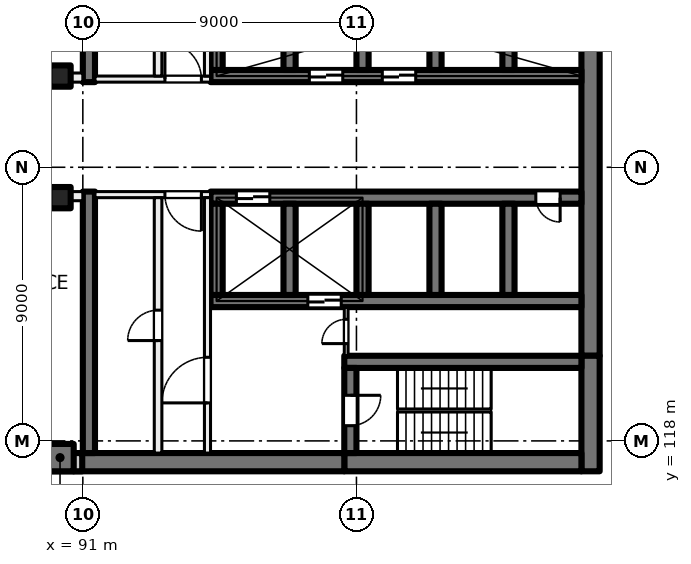
"""IFC4 building model, lengths in metres.
Left out: names, types, materials, properties, quantities, classifications, styles, units other than length and angle.
Written with IfcOpenShell. Run it as: python <this file> out.ifc"""

import sys

from ifc_helpers import new_model, si_unit, direction, frame, frame_2d, origin, origin_2d, place, context, subcontext, project, spatial, rectangle, extrude, element, fill, save


model = new_model("IFC4")
c1 = context("Model", 3, precision=1e-05, world=origin(), true_north=direction((0.0, 1.0)))
c2 = subcontext(c1, "Body", "Model", "MODEL_VIEW")
j1 = project(units=[si_unit("LENGTHUNIT", "METRE"), si_unit("PLANEANGLEUNIT", "RADIAN")], contexts=[c1])
p1 = place(None, origin())
s1 = spatial("IfcSite", under=j1, at=p1, CompositionType="ELEMENT")
p2 = place(p1, origin())
s2 = spatial("IfcBuilding", under=s1, at=p2, CompositionType="ELEMENT")
p3 = place(p2, frame((0.0, 0.0, 43.5)))
s3 = spatial("IfcBuildingStorey", under=s2, at=p3, CompositionType="ELEMENT", Elevation=43.5)
for number, where, z_axis, x_axis in (
    (1, (90.25, 130.0, 0.0), (0.0, 0.0, 1.0), (1.0, 0.0, 0.0)),
    (2, (90.25, 126.0, 0.0), (0.0, 0.0, 1.0), (1.0, 0.0, 0.0)),
):
    element("IfcColumn", number, at=place(p3, frame(where, z_axis=z_axis, x_axis=x_axis)), inside=s3, PredefinedType="COLUMN", context=c2, shape_type="SweptSolid", body=[
        extrude(rectangle(XDim=0.7, YDim=0.7, at=origin_2d()), origin(), (0.0, 0.0, 1.0), 4.0),
    ])
p4 = place(p3, frame((90.25, 117.45, 0.0), z_axis=(0.0, 0.0, 1.0), x_axis=(1.0, 0.0, 0.0)))
e3 = element("IfcColumn", 3, at=p4, inside=s3, PredefinedType="COLUMN", context=c2, shape_type="SweptSolid", body=[
    extrude(rectangle(XDim=0.9, YDim=0.9, at=origin_2d()), origin(), (0.0, 0.0, 1.0), 4.0),
])
p5 = place(p3, frame((107.7, 135.2, 0.0), z_axis=(0.0, 0.0, 1.0), x_axis=(0.0, -1.0, 0.0)))
e4 = element("IfcWall", 4, at=p5, inside=s3, PredefinedType="SHEAR", context=c2, shape_type="SweptSolid", body=[
    extrude(rectangle(XDim=14.4, YDim=0.6, at=frame_2d((7.2, 0.0))), origin(), (0.0, 0.0, 1.0), 4.0),
])
p6 = place(p3, frame((107.7, 120.8, 0.0), z_axis=(0.0, 0.0, 1.0), x_axis=(0.0, -1.0, 0.0)))
e5 = element("IfcWall", 5, at=p6, inside=s3, PredefinedType="SHEAR", context=c2, shape_type="SweptSolid", body=[
    extrude(rectangle(XDim=3.8, YDim=0.6, at=frame_2d((1.9, 0.0))), origin(), (0.0, 0.0, 1.0), 4.0),
])
p7 = place(p3, frame((107.4, 117.3, 0.0), z_axis=(0.0, 0.0, 1.0), x_axis=(-1.0, 0.0, 0.0)))
e6 = element("IfcWall", 6, at=p7, inside=s3, PredefinedType="SHEAR", context=c2, shape_type="SweptSolid", body=[
    extrude(rectangle(XDim=7.8, YDim=0.6, at=frame_2d((3.9, 0.0))), origin(), (0.0, 0.0, 1.0), 4.0),
])
p8 = place(p3, frame((99.6, 117.3, 0.0), z_axis=(0.0, 0.0, 1.0), x_axis=(-1.0, 0.0, 0.0)))
e7 = element("IfcWall", 7, at=p8, inside=s3, PredefinedType="SHEAR", context=c2, shape_type="SweptSolid", body=[
    extrude(rectangle(XDim=8.9, YDim=0.6, at=frame_2d((4.45, 0.0))), origin(), (0.0, 0.0, 1.0), 4.0),
])
p9 = place(p3, frame((107.4, 120.6, 0.0), z_axis=(0.0, 0.0, 1.0), x_axis=(-1.0, 0.0, 0.0)))
e8 = element("IfcWall", 8, at=p9, inside=s3, PredefinedType="SHEAR", context=c2, shape_type="SweptSolid", body=[
    extrude(rectangle(XDim=7.8, YDim=0.4, at=frame_2d((3.9, 0.0))), origin(), (0.0, 0.0, 1.0), 4.0),
])
p10 = place(p3, frame((99.8, 120.4, 0.0), z_axis=(0.0, 0.0, 1.0), x_axis=(0.0, -1.0, 0.0)))
e9 = element("IfcWall", 9, at=p10, inside=s3, PredefinedType="SHEAR", context=c2, shape_type="SweptSolid", body=[
    extrude(rectangle(XDim=2.8, YDim=0.4, at=frame_2d((1.4, 0.0))), origin(), (0.0, 0.0, 1.0), 4.0),
])
p11 = place(p10, frame((0.9, 0.0, 0.0)))
e10 = element("IfcOpeningElement", 10, at=p11, cuts=e9, PredefinedType="OPENING", context=c2, shape_type="SweptSolid", body=[
    extrude(rectangle(XDim=1.0, YDim=2.1, at=frame_2d((0.5, 1.05))), frame((0.0, 0.21, 0.0), z_axis=(0.0, -1.0, 0.0), x_axis=(1.0, 0.0, 0.0)), (0.0, 0.0, 1.0), 0.42),
])
p12 = place(p3, frame((107.4, 130.0, 0.0), z_axis=(0.0, 0.0, 1.0), x_axis=(-1.0, 0.0, 0.0)))
e11 = element("IfcWall", 11, at=p12, inside=s3, PredefinedType="SHEAR", context=c2, shape_type="SweptSolid", body=[
    extrude(rectangle(XDim=12.2, YDim=0.4, at=frame_2d((6.1, 0.0))), origin(), (0.0, 0.0, 1.0), 4.0),
])
p13 = place(p12, frame((5.45, 0.0, 0.0)))
e12 = element("IfcOpeningElement", 12, at=p13, cuts=e11, PredefinedType="OPENING", context=c2, shape_type="SweptSolid", body=[
    extrude(rectangle(XDim=1.1, YDim=2.1, at=frame_2d((0.55, 1.05))), frame((0.0, 0.21, 0.0), z_axis=(0.0, -1.0, 0.0), x_axis=(1.0, 0.0, 0.0)), (0.0, 0.0, 1.0), 0.42),
])
p14 = place(p12, frame((7.85, 0.0, 0.0)))
e13 = element("IfcOpeningElement", 13, at=p14, cuts=e11, PredefinedType="OPENING", context=c2, shape_type="SweptSolid", body=[
    extrude(rectangle(XDim=1.1, YDim=2.1, at=frame_2d((0.55, 1.05))), frame((0.0, 0.21, 0.0), z_axis=(0.0, -1.0, 0.0), x_axis=(1.0, 0.0, 0.0)), (0.0, 0.0, 1.0), 0.42),
])
for number, where, z_axis, x_axis in (
    (14, (105.0, 133.2, 0.0), (0.0, 0.0, 1.0), (0.0, -1.0, 0.0)),
    (15, (102.6, 133.2, 0.0), (0.0, 0.0, 1.0), (0.0, -1.0, 0.0)),
    (16, (100.2, 133.2, 0.0), (0.0, 0.0, 1.0), (0.0, -1.0, 0.0)),
    (17, (97.8, 133.2, 0.0), (0.0, 0.0, 1.0), (0.0, -1.0, 0.0)),
    (18, (95.4, 133.2, 0.0), (0.0, 0.0, 1.0), (0.0, -1.0, 0.0)),
):
    element("IfcWall", number, at=place(p3, frame(where, z_axis=z_axis, x_axis=x_axis)), inside=s3, PredefinedType="SHEAR", context=c2, shape_type="SweptSolid", body=[
        extrude(rectangle(XDim=3.0, YDim=0.4, at=frame_2d((1.5, 0.0))), origin(), (0.0, 0.0, 1.0), 4.0),
    ])
p15 = place(p3, frame((107.4, 126.0, 0.0), z_axis=(0.0, 0.0, 1.0), x_axis=(-1.0, 0.0, 0.0)))
e19 = element("IfcWall", 19, at=p15, inside=s3, PredefinedType="SHEAR", context=c2, shape_type="SweptSolid", body=[
    extrude(rectangle(XDim=12.2, YDim=0.4, at=frame_2d((6.1, 0.0))), origin(), (0.0, 0.0, 1.0), 4.0),
])
p16 = place(p15, frame((10.25, 0.0, 0.0)))
e20 = element("IfcOpeningElement", 20, at=p16, cuts=e19, PredefinedType="OPENING", context=c2, shape_type="SweptSolid", body=[
    extrude(rectangle(XDim=1.1, YDim=2.1, at=frame_2d((0.55, 1.05))), frame((0.0, 0.21, 0.0), z_axis=(0.0, -1.0, 0.0), x_axis=(1.0, 0.0, 0.0)), (0.0, 0.0, 1.0), 0.42),
])
p17 = place(p15, frame((0.7, 0.0, 0.0)))
e21 = element("IfcOpeningElement", 21, at=p17, cuts=e19, PredefinedType="OPENING", context=c2, shape_type="SweptSolid", body=[
    extrude(rectangle(XDim=0.8, YDim=2.1, at=frame_2d((0.4, 1.05))), frame((0.0, 0.21, 0.0), z_axis=(0.0, -1.0, 0.0), x_axis=(1.0, 0.0, 0.0)), (0.0, 0.0, 1.0), 0.42),
])
p18 = place(p3, frame((107.4, 122.6, 0.0), z_axis=(0.0, 0.0, 1.0), x_axis=(-1.0, 0.0, 0.0)))
e22 = element("IfcWall", 22, at=p18, inside=s3, PredefinedType="SHEAR", context=c2, shape_type="SweptSolid", body=[
    extrude(rectangle(XDim=12.2, YDim=0.4, at=frame_2d((6.1, 0.0))), origin(), (0.0, 0.0, 1.0), 4.0),
])
p19 = place(p18, frame((7.9, 0.0, 0.0)))
e23 = element("IfcOpeningElement", 23, at=p19, cuts=e22, PredefinedType="OPENING", context=c2, shape_type="SweptSolid", body=[
    extrude(rectangle(XDim=1.1, YDim=2.1, at=frame_2d((0.55, 1.05))), frame((0.0, 0.21, 0.0), z_axis=(0.0, -1.0, 0.0), x_axis=(1.0, 0.0, 0.0)), (0.0, 0.0, 1.0), 0.42),
])
for number, where, z_axis, x_axis in (
    (24, (105.0, 125.8, 0.0), (0.0, 0.0, 1.0), (0.0, -1.0, 0.0)),
    (25, (102.6, 125.8, 0.0), (0.0, 0.0, 1.0), (0.0, -1.0, 0.0)),
    (26, (100.2, 125.8, 0.0), (0.0, 0.0, 1.0), (0.0, -1.0, 0.0)),
    (27, (97.8, 125.8, 0.0), (0.0, 0.0, 1.0), (0.0, -1.0, 0.0)),
    (28, (95.4, 125.8, 0.0), (0.0, 0.0, 1.0), (0.0, -1.0, 0.0)),
):
    element("IfcWall", number, at=place(p3, frame(where, z_axis=z_axis, x_axis=x_axis)), inside=s3, PredefinedType="SHEAR", context=c2, shape_type="SweptSolid", body=[
        extrude(rectangle(XDim=3.0, YDim=0.4, at=frame_2d((1.5, 0.0))), origin(), (0.0, 0.0, 1.0), 4.0),
    ])
for number, where, z_axis, x_axis in (
    (29, (91.2, 138.4, 0.0), (0.0, 0.0, 1.0), (0.0, -1.0, 0.0)),
    (30, (91.2, 126.2, 0.0), (0.0, 0.0, 1.0), (0.0, -1.0, 0.0)),
):
    element("IfcWall", number, at=place(p3, frame(where, z_axis=z_axis, x_axis=x_axis)), inside=s3, PredefinedType="SHEAR", context=c2, shape_type="SweptSolid", body=[
        extrude(rectangle(XDim=8.6, YDim=0.4, at=frame_2d((4.3, 0.0))), origin(), (0.0, 0.0, 1.0), 4.0),
    ])
p20 = place(p3, frame((90.98, 117.3, 0.0), z_axis=(0.0, 0.0, 1.0), x_axis=(-1.0, 0.0, 0.0)))
e31 = element("IfcWall", 31, at=p20, inside=s3, PredefinedType="SOLIDWALL", context=c2, shape_type="SweptSolid", body=[
    extrude(rectangle(XDim=33.745, YDim=0.6, at=frame_2d((16.873, 0.0))), origin(), (0.0, 0.0, 1.0), 3.625),
])
p21 = place(p20, frame((1.48, 0.0, 0.9)))
e32 = element("IfcOpeningElement", 32, at=p21, cuts=e31, PredefinedType="OPENING", context=c2, shape_type="SweptSolid", body=[
    extrude(rectangle(XDim=3.0, YDim=2.4, at=frame_2d((1.5, 1.2))), frame((0.0, 0.31, 0.0), z_axis=(0.0, -1.0, 0.0), x_axis=(1.0, 0.0, 0.0)), (0.0, 0.0, 1.0), 0.62),
])
p22 = place(p20, frame((5.98, 0.0, 0.9)))
e33 = element("IfcOpeningElement", 33, at=p22, cuts=e31, PredefinedType="OPENING", context=c2, shape_type="SweptSolid", body=[
    extrude(rectangle(XDim=3.0, YDim=2.4, at=frame_2d((1.5, 1.2))), frame((0.0, 0.31, 0.0), z_axis=(0.0, -1.0, 0.0), x_axis=(1.0, 0.0, 0.0)), (0.0, 0.0, 1.0), 0.62),
])
p23 = place(p20, frame((10.48, 0.0, 0.9)))
e34 = element("IfcOpeningElement", 34, at=p23, cuts=e31, PredefinedType="OPENING", context=c2, shape_type="SweptSolid", body=[
    extrude(rectangle(XDim=3.0, YDim=2.4, at=frame_2d((1.5, 1.2))), frame((0.0, 0.31, 0.0), z_axis=(0.0, -1.0, 0.0), x_axis=(1.0, 0.0, 0.0)), (0.0, 0.0, 1.0), 0.62),
])
p24 = place(p20, frame((14.98, 0.0, 0.9)))
e35 = element("IfcOpeningElement", 35, at=p24, cuts=e31, PredefinedType="OPENING", context=c2, shape_type="SweptSolid", body=[
    extrude(rectangle(XDim=3.0, YDim=2.4, at=frame_2d((1.5, 1.2))), frame((0.0, 0.31, 0.0), z_axis=(0.0, -1.0, 0.0), x_axis=(1.0, 0.0, 0.0)), (0.0, 0.0, 1.0), 0.62),
])
p25 = place(p20, frame((19.48, 0.0, 0.9)))
e36 = element("IfcOpeningElement", 36, at=p25, cuts=e31, PredefinedType="OPENING", context=c2, shape_type="SweptSolid", body=[
    extrude(rectangle(XDim=3.0, YDim=2.4, at=frame_2d((1.5, 1.2))), frame((0.0, 0.31, 0.0), z_axis=(0.0, -1.0, 0.0), x_axis=(1.0, 0.0, 0.0)), (0.0, 0.0, 1.0), 0.62),
])
p26 = place(p20, frame((24.58, 0.0, 0.0)))
e37 = element("IfcOpeningElement", 37, at=p26, cuts=e31, PredefinedType="OPENING", context=c2, shape_type="SweptSolid", body=[
    extrude(rectangle(XDim=1.8, YDim=2.4, at=frame_2d((0.9, 1.2))), frame((0.0, 0.31, 0.0), z_axis=(0.0, -1.0, 0.0), x_axis=(1.0, 0.0, 0.0)), (0.0, 0.0, 1.0), 0.62),
])
p27 = place(p20, frame((28.48, 0.0, 0.9)))
e38 = element("IfcOpeningElement", 38, at=p27, cuts=e31, PredefinedType="OPENING", context=c2, shape_type="SweptSolid", body=[
    extrude(rectangle(XDim=3.0, YDim=2.4, at=frame_2d((1.5, 1.2))), frame((0.0, 0.31, 0.0), z_axis=(0.0, -1.0, 0.0), x_axis=(1.0, 0.0, 0.0)), (0.0, 0.0, 1.0), 0.62),
])
p28 = place(p3, frame((95.2, 126.1, 0.0), z_axis=(0.0, 0.0, 1.0), x_axis=(-1.0, 0.0, 0.0)))
e39 = element("IfcWall", 39, at=p28, inside=s3, PredefinedType="PARTITIONING", context=c2, shape_type="SweptSolid", body=[
    extrude(rectangle(XDim=3.8, YDim=0.2, at=frame_2d((1.9, 0.0))), origin(), (0.0, 0.0, 1.0), 3.625),
])
p29 = place(p28, frame((0.3, 0.0, 0.0)))
e40 = element("IfcOpeningElement", 40, at=p29, cuts=e39, PredefinedType="OPENING", context=c2, shape_type="SweptSolid", body=[
    extrude(rectangle(XDim=1.2, YDim=2.1, at=frame_2d((0.6, 1.05))), frame((0.0, 0.11, 0.0), z_axis=(0.0, -1.0, 0.0), x_axis=(1.0, 0.0, 0.0)), (0.0, 0.0, 1.0), 0.22),
])
p30 = place(p3, frame((95.1, 117.6, 0.0), z_axis=(0.0, 0.0, 1.0), x_axis=(0.0, 1.0, 0.0)))
e41 = element("IfcWall", 41, at=p30, inside=s3, PredefinedType="PARTITIONING", context=c2, shape_type="SweptSolid", body=[
    extrude(rectangle(XDim=8.4, YDim=0.2, at=frame_2d((4.2, 0.0))), origin(), (0.0, 0.0, 1.0), 3.625),
])
p31 = place(p30, frame((1.65, 0.0, 0.0)))
e42 = element("IfcOpeningElement", 42, at=p31, cuts=e41, PredefinedType="OPENING", context=c2, shape_type="SweptSolid", body=[
    extrude(rectangle(XDim=1.5, YDim=2.1, at=frame_2d((0.75, 1.05))), frame((0.0, 0.11, 0.0), z_axis=(0.0, -1.0, 0.0), x_axis=(1.0, 0.0, 0.0)), (0.0, 0.0, 1.0), 0.22),
])
p32 = place(p3, frame((93.475, 117.6, 0.0), z_axis=(0.0, 0.0, 1.0), x_axis=(0.0, 1.0, 0.0)))
e43 = element("IfcWall", 43, at=p32, inside=s3, PredefinedType="PARTITIONING", context=c2, shape_type="SweptSolid", body=[
    extrude(rectangle(XDim=8.4, YDim=0.25, at=frame_2d((4.2, 0.0))), origin(), (0.0, 0.0, 1.0), 3.625),
])
p33 = place(p32, frame((3.7, 0.0, 0.0)))
e44 = element("IfcOpeningElement", 44, at=p33, cuts=e43, PredefinedType="OPENING", context=c2, shape_type="SweptSolid", body=[
    extrude(rectangle(XDim=1.0, YDim=2.1, at=frame_2d((0.5, 1.05))), frame((0.0, 0.135, 0.0), z_axis=(0.0, -1.0, 0.0), x_axis=(1.0, 0.0, 0.0)), (0.0, 0.0, 1.0), 0.27),
])
p34 = place(p3, frame((99.663, 120.8, 0.0), z_axis=(0.0, 0.0, 1.0), x_axis=(0.0, 1.0, 0.0)))
e45 = element("IfcWall", 45, at=p34, inside=s3, PredefinedType="PARTITIONING", context=c2, shape_type="SweptSolid", body=[
    extrude(rectangle(XDim=1.6, YDim=0.125, at=frame_2d((0.8, 0.0))), origin(), (0.0, 0.0, 1.0), 3.625),
])
p35 = place(p34, frame((0.4, 0.0, 0.0)))
e46 = element("IfcOpeningElement", 46, at=p35, cuts=e45, PredefinedType="OPENING", context=c2, shape_type="SweptSolid", body=[
    extrude(rectangle(XDim=0.8, YDim=2.1, at=frame_2d((0.4, 1.05))), frame((0.0, 0.073, 0.0), z_axis=(0.0, -1.0, 0.0), x_axis=(1.0, 0.0, 0.0)), (0.0, 0.0, 1.0), 0.145),
])
p36 = place(p3, frame((91.4, 129.9, 0.0), z_axis=(0.0, 0.0, 1.0), x_axis=(1.0, 0.0, 0.0)))
e47 = element("IfcWall", 47, at=p36, inside=s3, PredefinedType="PARTITIONING", context=c2, shape_type="SweptSolid", body=[
    extrude(rectangle(XDim=3.8, YDim=0.2, at=frame_2d((1.9, 0.0))), origin(), (0.0, 0.0, 1.0), 3.625),
])
p37 = place(p36, frame((2.3, 0.0, 0.0)))
e48 = element("IfcOpeningElement", 48, at=p37, cuts=e47, PredefinedType="OPENING", context=c2, shape_type="SweptSolid", body=[
    extrude(rectangle(XDim=1.2, YDim=2.1, at=frame_2d((0.6, 1.05))), frame((0.0, 0.11, 0.0), z_axis=(0.0, -1.0, 0.0), x_axis=(1.0, 0.0, 0.0)), (0.0, 0.0, 1.0), 0.22),
])
p38 = place(p3, frame((95.1, 130.0, 0.0), z_axis=(0.0, 0.0, 1.0), x_axis=(0.0, 1.0, 0.0)))
e49 = element("IfcWall", 49, at=p38, inside=s3, PredefinedType="PARTITIONING", context=c2, shape_type="SweptSolid", body=[
    extrude(rectangle(XDim=8.4, YDim=0.2, at=frame_2d((4.2, 0.0))), origin(), (0.0, 0.0, 1.0), 3.625),
])
p39 = place(p38, frame((5.25, 0.0, 0.0)))
e50 = element("IfcOpeningElement", 50, at=p39, cuts=e49, PredefinedType="OPENING", context=c2, shape_type="SweptSolid", body=[
    extrude(rectangle(XDim=1.5, YDim=2.1, at=frame_2d((0.75, 1.05))), frame((0.0, 0.11, 0.0), z_axis=(0.0, -1.0, 0.0), x_axis=(1.0, 0.0, 0.0)), (0.0, 0.0, 1.0), 0.22),
])
p40 = place(p3, frame((93.475, 130.0, 0.0), z_axis=(0.0, 0.0, 1.0), x_axis=(0.0, 1.0, 0.0)))
e51 = element("IfcWall", 51, at=p40, inside=s3, PredefinedType="PARTITIONING", context=c2, shape_type="SweptSolid", body=[
    extrude(rectangle(XDim=8.4, YDim=0.25, at=frame_2d((4.2, 0.0))), origin(), (0.0, 0.0, 1.0), 3.625),
])
p41 = place(p40, frame((2.375, 0.0, 0.0)))
e52 = element("IfcOpeningElement", 52, at=p41, cuts=e51, PredefinedType="OPENING", context=c2, shape_type="SweptSolid", body=[
    extrude(rectangle(XDim=0.8, YDim=2.1, at=frame_2d((0.4, 1.05))), frame((0.0, 0.135, 0.0), z_axis=(0.0, -1.0, 0.0), x_axis=(1.0, 0.0, 0.0)), (0.0, 0.0, 1.0), 0.27),
])
p42 = place(p40, frame((6.625, 0.0, 0.0)))
e53 = element("IfcOpeningElement", 53, at=p42, cuts=e51, PredefinedType="OPENING", context=c2, shape_type="SweptSolid", body=[
    extrude(rectangle(XDim=0.8, YDim=2.1, at=frame_2d((0.4, 1.05))), frame((0.0, 0.135, 0.0), z_axis=(0.0, -1.0, 0.0), x_axis=(1.0, 0.0, 0.0)), (0.0, 0.0, 1.0), 0.27),
])
p43 = place(p3, frame((72.5, 129.95, 0.0), z_axis=(0.0, 0.0, 1.0), x_axis=(1.0, 0.0, 0.0)))
e54 = element("IfcWall", 54, at=p43, inside=s3, PredefinedType="PARTITIONING", context=c2, shape_type="SweptSolid", body=[
    extrude(rectangle(XDim=18.5, YDim=0.3, at=frame_2d((9.25, 0.0))), origin(), (0.0, 0.0, 1.0), 3.625),
])
p44 = place(p43, frame((6.0, 0.0, 0.0)))
e55 = element("IfcOpeningElement", 55, at=p44, cuts=e54, PredefinedType="OPENING", context=c2, shape_type="SweptSolid", body=[
    extrude(rectangle(XDim=1.0, YDim=2.1, at=frame_2d((0.5, 1.05))), frame((0.0, 0.16, 0.0), z_axis=(0.0, -1.0, 0.0), x_axis=(1.0, 0.0, 0.0)), (0.0, 0.0, 1.0), 0.32),
])
p45 = place(p43, frame((1.225, 0.0, 0.0)))
e56 = element("IfcOpeningElement", 56, at=p45, cuts=e54, PredefinedType="OPENING", context=c2, shape_type="SweptSolid", body=[
    extrude(rectangle(XDim=1.8, YDim=2.1, at=frame_2d((0.9, 1.05))), frame((0.0, 0.16, 0.0), z_axis=(0.0, -1.0, 0.0), x_axis=(1.0, 0.0, 0.0)), (0.0, 0.0, 1.0), 0.32),
])
p46 = place(p3, frame((91.0, 126.05, 0.0), z_axis=(0.0, 0.0, 1.0), x_axis=(-1.0, 0.0, 0.0)))
e57 = element("IfcWall", 57, at=p46, inside=s3, PredefinedType="PARTITIONING", context=c2, shape_type="SweptSolid", body=[
    extrude(rectangle(XDim=43.785, YDim=0.3, at=frame_2d((21.893, 0.0))), origin(), (0.0, 0.0, 1.0), 3.625),
])
p47 = place(p46, frame((4.375, 0.0, 0.0)))
e58 = element("IfcOpeningElement", 58, at=p47, cuts=e57, PredefinedType="OPENING", context=c2, shape_type="SweptSolid", body=[
    extrude(rectangle(XDim=1.0, YDim=2.1, at=frame_2d((0.5, 1.05))), frame((0.0, 0.16, 0.0), z_axis=(0.0, -1.0, 0.0), x_axis=(1.0, 0.0, 0.0)), (0.0, 0.0, 1.0), 0.32),
])
p48 = place(p46, frame((15.0, 0.0, 0.0)))
e59 = element("IfcOpeningElement", 59, at=p48, cuts=e57, PredefinedType="OPENING", context=c2, shape_type="SweptSolid", body=[
    extrude(rectangle(XDim=1.0, YDim=2.1, at=frame_2d((0.5, 1.05))), frame((0.0, 0.16, 0.0), z_axis=(0.0, -1.0, 0.0), x_axis=(1.0, 0.0, 0.0)), (0.0, 0.0, 1.0), 0.32),
])
p49 = place(p46, frame((34.0, 0.0, 0.0)))
e60 = element("IfcOpeningElement", 60, at=p49, cuts=e57, PredefinedType="OPENING", context=c2, shape_type="SweptSolid", body=[
    extrude(rectangle(XDim=1.0, YDim=2.1, at=frame_2d((0.5, 1.05))), frame((0.0, 0.16, 0.0), z_axis=(0.0, -1.0, 0.0), x_axis=(1.0, 0.0, 0.0)), (0.0, 0.0, 1.0), 0.32),
])
p50 = place(p46, frame((39.296, 0.0, 0.0)))
e61 = element("IfcOpeningElement", 61, at=p50, cuts=e57, PredefinedType="OPENING", context=c2, shape_type="SweptSolid", body=[
    extrude(rectangle(XDim=1.8, YDim=2.1, at=frame_2d((0.9, 1.05))), frame((0.0, 0.16, 0.0), z_axis=(0.0, -1.0, 0.0), x_axis=(1.0, 0.0, 0.0)), (0.0, 0.0, 1.0), 0.32),
])
p51 = place(p16, origin())
e62 = element("IfcDoor", 62, at=p51, inside=s3, OperationType="DOUBLE_DOOR_SLIDING", PredefinedType="DOOR", context=c2, shape_type="SweptSolid", body=[
    extrude(rectangle(XDim=1.1, YDim=2.1, at=frame_2d((0.55, 1.05))), frame((0.0, 0.025, 0.0), z_axis=(0.0, -1.0, 0.0), x_axis=(1.0, 0.0, 0.0)), (0.0, 0.0, 1.0), 0.05),
])
fill(e20, e62)
p52 = place(p13, origin())
e63 = element("IfcDoor", 63, at=p52, inside=s3, OperationType="DOUBLE_DOOR_SLIDING", PredefinedType="DOOR", context=c2, shape_type="SweptSolid", body=[
    extrude(rectangle(XDim=1.1, YDim=2.1, at=frame_2d((0.55, 1.05))), frame((0.0, 0.025, 0.0), z_axis=(0.0, -1.0, 0.0), x_axis=(1.0, 0.0, 0.0)), (0.0, 0.0, 1.0), 0.05),
])
fill(e12, e63)
p53 = place(p14, origin())
e64 = element("IfcDoor", 64, at=p53, inside=s3, OperationType="DOUBLE_DOOR_SLIDING", PredefinedType="DOOR", context=c2, shape_type="SweptSolid", body=[
    extrude(rectangle(XDim=1.1, YDim=2.1, at=frame_2d((0.55, 1.05))), frame((0.0, 0.025, 0.0), z_axis=(0.0, -1.0, 0.0), x_axis=(1.0, 0.0, 0.0)), (0.0, 0.0, 1.0), 0.05),
])
fill(e13, e64)
p54 = place(p17, origin())
e65 = element("IfcDoor", 65, at=p54, inside=s3, OperationType="SINGLE_SWING_LEFT", PredefinedType="DOOR", context=c2, shape_type="SweptSolid", body=[
    extrude(rectangle(XDim=0.8, YDim=2.1, at=frame_2d((0.4, 1.05))), frame((0.0, 0.025, 0.0), z_axis=(0.0, -1.0, 0.0), x_axis=(1.0, 0.0, 0.0)), (0.0, 0.0, 1.0), 0.05),
])
fill(e21, e65)
p55 = place(p29, origin())
e66 = element("IfcDoor", 66, at=p55, inside=s3, OperationType="DOUBLE_DOOR_SINGLE_SWING", PredefinedType="DOOR", context=c2, shape_type="SweptSolid", body=[
    extrude(rectangle(XDim=1.2, YDim=2.1, at=frame_2d((0.6, 1.05))), frame((0.0, 0.025, 0.0), z_axis=(0.0, -1.0, 0.0), x_axis=(1.0, 0.0, 0.0)), (0.0, 0.0, 1.0), 0.05),
])
fill(e40, e66)
p56 = place(p31, origin())
e67 = element("IfcDoor", 67, at=p56, inside=s3, OperationType="DOUBLE_DOOR_SINGLE_SWING", PredefinedType="DOOR", context=c2, shape_type="SweptSolid", body=[
    extrude(rectangle(XDim=1.5, YDim=2.1, at=frame_2d((0.75, 1.05))), frame((0.0, 0.025, 0.0), z_axis=(0.0, -1.0, 0.0), x_axis=(1.0, 0.0, 0.0)), (0.0, 0.0, 1.0), 0.05),
])
fill(e42, e67)
p57 = place(p11, origin())
e68 = element("IfcDoor", 68, at=p57, inside=s3, OperationType="SINGLE_SWING_LEFT", PredefinedType="DOOR", context=c2, shape_type="SweptSolid", body=[
    extrude(rectangle(XDim=1.0, YDim=2.1, at=frame_2d((0.5, 1.05))), frame((0.0, 0.025, 0.0), z_axis=(0.0, -1.0, 0.0), x_axis=(1.0, 0.0, 0.0)), (0.0, 0.0, 1.0), 0.05),
])
fill(e10, e68)
p58 = place(p35, origin())
e69 = element("IfcDoor", 69, at=p58, inside=s3, OperationType="SINGLE_SWING_RIGHT", PredefinedType="DOOR", context=c2, shape_type="SweptSolid", body=[
    extrude(rectangle(XDim=0.8, YDim=2.1, at=frame_2d((0.4, 1.05))), frame((0.0, 0.025, 0.0), z_axis=(0.0, -1.0, 0.0), x_axis=(1.0, 0.0, 0.0)), (0.0, 0.0, 1.0), 0.05),
])
fill(e46, e69)
p59 = place(p33, origin())
e70 = element("IfcDoor", 70, at=p59, inside=s3, OperationType="SINGLE_SWING_LEFT", PredefinedType="DOOR", context=c2, shape_type="SweptSolid", body=[
    extrude(rectangle(XDim=1.0, YDim=2.1, at=frame_2d((0.5, 1.05))), frame((0.0, 0.025, 0.0), z_axis=(0.0, -1.0, 0.0), x_axis=(1.0, 0.0, 0.0)), (0.0, 0.0, 1.0), 0.05),
])
fill(e44, e70)
p60 = place(p37, origin())
e71 = element("IfcDoor", 71, at=p60, inside=s3, OperationType="DOUBLE_DOOR_SINGLE_SWING", PredefinedType="DOOR", context=c2, shape_type="SweptSolid", body=[
    extrude(rectangle(XDim=1.2, YDim=2.1, at=frame_2d((0.6, 1.05))), frame((0.0, 0.025, 0.0), z_axis=(0.0, -1.0, 0.0), x_axis=(1.0, 0.0, 0.0)), (0.0, 0.0, 1.0), 0.05),
])
fill(e48, e71)
p61 = place(p19, origin())
e72 = element("IfcDoor", 72, at=p61, inside=s3, OperationType="DOUBLE_DOOR_SLIDING", PredefinedType="DOOR", context=c2, shape_type="SweptSolid", body=[
    extrude(rectangle(XDim=1.1, YDim=2.1, at=frame_2d((0.55, 1.05))), frame((0.0, 0.025, 0.0), z_axis=(0.0, -1.0, 0.0), x_axis=(1.0, 0.0, 0.0)), (0.0, 0.0, 1.0), 0.05),
])
fill(e23, e72)
save(model, sys.argv[1])
